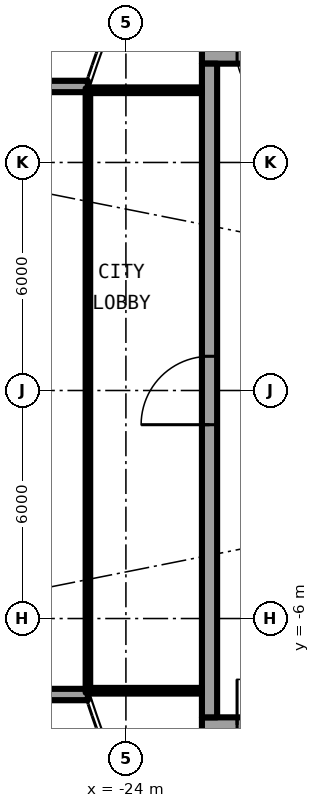
"""IFC4 building model, lengths in metres.
Left out: names, types, materials, properties, quantities, classifications, styles, units other than length and angle.
Written with IfcOpenShell. Run it as: python <this file> out.ifc"""

import sys

from ifc_helpers import new_model, si_unit, direction, frame, frame_2d, origin, place, context, subcontext, project, spatial, rectangle, extrude, element, fill, save


model = new_model("IFC4")
c1 = context("Model", 3, precision=1e-05, world=origin(), true_north=direction((0.0, 1.0)))
c2 = subcontext(c1, "Body", "Model", "MODEL_VIEW")
j1 = project(units=[si_unit("LENGTHUNIT", "METRE"), si_unit("PLANEANGLEUNIT", "RADIAN")], contexts=[c1])
p1 = place(None, origin())
s1 = spatial("IfcSite", under=j1, at=p1, CompositionType="ELEMENT")
p2 = place(p1, origin())
s2 = spatial("IfcBuilding", under=s1, at=p2, CompositionType="ELEMENT")
p3 = place(p2, frame((0.0, 0.0, 234.05)))
s3 = spatial("IfcBuildingStorey", under=s2, at=p3, CompositionType="ELEMENT", Elevation=234.05)
for number, where, z_axis, x_axis in (
    (1, (-25.0, 8.0, 0.0), (0.0, 0.0, 1.0), (-1.0, 0.0, 0.0)),
    (2, (-25.0, -8.0, 0.0), (0.0, 0.0, 1.0), (-1.0, 0.0, 0.0)),
):
    element("IfcWall", number, at=place(p3, frame(where, z_axis=z_axis, x_axis=x_axis)), inside=s3, PredefinedType="SOLIDWALL", context=c2, shape_type="SweptSolid", body=[
        extrude(rectangle(XDim=2.667, YDim=0.3, at=frame_2d((1.333, 0.0))), origin(), (0.0, 0.0, 1.0), 2.7),
    ])
p4 = place(p3, frame((-22.0, -8.8, 0.0), z_axis=(0.0, 0.0, 1.0), x_axis=(1.0, 0.0, 0.0)))
e3 = element("IfcWall", 3, at=p4, inside=s3, PredefinedType="SHEAR", context=c2, shape_type="SweptSolid", body=[
    extrude(rectangle(XDim=13.4, YDim=0.4, at=frame_2d((6.7, 0.0))), origin(), (0.0, 0.0, 1.0), 3.05),
])
p5 = place(p4, frame((0.925, 0.0, 0.0)))
e4 = element("IfcOpeningElement", 4, at=p5, cuts=e3, PredefinedType="OPENING", context=c2, shape_type="SweptSolid", body=[
    extrude(rectangle(XDim=1.2, YDim=2.3, at=frame_2d((0.6, 1.15))), frame((0.0, 0.21, 0.0), z_axis=(0.0, -1.0, 0.0), x_axis=(1.0, 0.0, 0.0)), (0.0, 0.0, 1.0), 0.42),
])
p6 = place(p3, frame((-8.6, 8.8, 0.0), z_axis=(0.0, 0.0, 1.0), x_axis=(-1.0, 0.0, 0.0)))
e5 = element("IfcWall", 5, at=p6, inside=s3, PredefinedType="SHEAR", context=c2, shape_type="SweptSolid", body=[
    extrude(rectangle(XDim=13.4, YDim=0.4, at=frame_2d((6.7, 0.0))), origin(), (0.0, 0.0, 1.0), 3.05),
])
p7 = place(p6, frame((11.275, 0.0, 0.0)))
e6 = element("IfcOpeningElement", 6, at=p7, cuts=e5, PredefinedType="OPENING", context=c2, shape_type="SweptSolid", body=[
    extrude(rectangle(XDim=1.2, YDim=2.3, at=frame_2d((0.6, 1.15))), frame((0.0, 0.21, 0.0), z_axis=(0.0, -1.0, 0.0), x_axis=(1.0, 0.0, 0.0)), (0.0, 0.0, 1.0), 0.42),
])
p8 = place(p3, frame((-21.8, -8.6, 0.0), z_axis=(0.0, 0.0, 1.0), x_axis=(0.0, 1.0, 0.0)))
e7 = element("IfcWall", 7, at=p8, inside=s3, PredefinedType="SHEAR", context=c2, shape_type="SweptSolid", body=[
    extrude(rectangle(XDim=17.2, YDim=0.4, at=frame_2d((8.6, 0.0))), origin(), (0.0, 0.0, 1.0), 3.05),
])
p9 = place(p8, frame((7.7, 0.0, 0.0)))
e8 = element("IfcOpeningElement", 8, at=p9, cuts=e7, PredefinedType="OPENING", context=c2, shape_type="SweptSolid", body=[
    extrude(rectangle(XDim=1.8, YDim=2.3, at=frame_2d((0.9, 1.15))), frame((0.0, 0.21, 0.0), z_axis=(0.0, -1.0, 0.0), x_axis=(1.0, 0.0, 0.0)), (0.0, 0.0, 1.0), 0.42),
])
for number, where, z_axis, x_axis in (
    (9, (-22.0, 7.9, 0.0), (0.0, 0.0, 1.0), (-1.0, 0.0, 0.0)),
    (10, (-22.0, -7.9, 0.0), (0.0, 0.0, 1.0), (-1.0, 0.0, 0.0)),
):
    element("IfcWall", number, at=place(p3, frame(where, z_axis=z_axis, x_axis=x_axis)), inside=s3, PredefinedType="PARTITIONING", context=c2, shape_type="SweptSolid", body=[
        extrude(rectangle(XDim=2.94, YDim=0.15, at=frame_2d((1.47, 0.0))), origin(), (0.0, 0.0, 1.0), 2.7),
    ])
p10 = place(p3, frame((-25.0, 7.95, 0.0), z_axis=(0.0, 0.0, 1.0), x_axis=(0.0, -1.0, 0.0)))
e11 = element("IfcWall", 11, at=p10, inside=s3, PredefinedType="PARTITIONING", context=c2, shape_type="SweptSolid", body=[
    extrude(rectangle(XDim=15.9, YDim=0.12, at=frame_2d((7.95, 0.0))), origin(), (0.0, 0.0, 1.0), 2.7),
])
p11 = place(p10, frame((0.95, 0.0, 0.1)))
e12 = element("IfcOpeningElement", 12, at=p11, cuts=e11, PredefinedType="OPENING", context=c2, shape_type="SweptSolid", body=[
    extrude(rectangle(XDim=14.0, YDim=2.35, at=frame_2d((7.0, 1.175))), frame((0.0, 0.07, 0.0), z_axis=(0.0, -1.0, 0.0), x_axis=(1.0, 0.0, 0.0)), (0.0, 0.0, 1.0), 0.14),
])
p12 = place(p5, origin())
e13 = element("IfcDoor", 13, at=p12, inside=s3, OperationType="SINGLE_SWING_RIGHT", PredefinedType="DOOR", context=c2, shape_type="SweptSolid", body=[
    extrude(rectangle(XDim=1.2, YDim=2.3, at=frame_2d((0.6, 1.15))), frame((0.0, 0.025, 0.0), z_axis=(0.0, -1.0, 0.0), x_axis=(1.0, 0.0, 0.0)), (0.0, 0.0, 1.0), 0.05),
])
fill(e4, e13)
p13 = place(p7, origin())
e14 = element("IfcDoor", 14, at=p13, inside=s3, OperationType="SINGLE_SWING_LEFT", PredefinedType="DOOR", context=c2, shape_type="SweptSolid", body=[
    extrude(rectangle(XDim=1.2, YDim=2.3, at=frame_2d((0.6, 1.15))), frame((0.0, 0.025, 0.0), z_axis=(0.0, -1.0, 0.0), x_axis=(1.0, 0.0, 0.0)), (0.0, 0.0, 1.0), 0.05),
])
fill(e6, e14)
p14 = place(p9, origin())
e15 = element("IfcDoor", 15, at=p14, inside=s3, OperationType="SINGLE_SWING_LEFT", PredefinedType="DOOR", context=c2, shape_type="SweptSolid", body=[
    extrude(rectangle(XDim=1.8, YDim=2.3, at=frame_2d((0.9, 1.15))), frame((0.0, 0.025, 0.0), z_axis=(0.0, -1.0, 0.0), x_axis=(1.0, 0.0, 0.0)), (0.0, 0.0, 1.0), 0.05),
])
fill(e8, e15)
p15 = place(p11, origin())
e16 = element("IfcWindow", 16, at=p15, inside=s3, PartitioningType="SINGLE_PANEL", PredefinedType="WINDOW", context=c2, shape_type="SweptSolid", body=[
    extrude(rectangle(XDim=14.0, YDim=2.35, at=frame_2d((7.0, 1.175))), frame((0.0, 0.03, 0.0), z_axis=(0.0, -1.0, 0.0), x_axis=(1.0, 0.0, 0.0)), (0.0, 0.0, 1.0), 0.06),
])
fill(e12, e16)
save(model, sys.argv[1])
